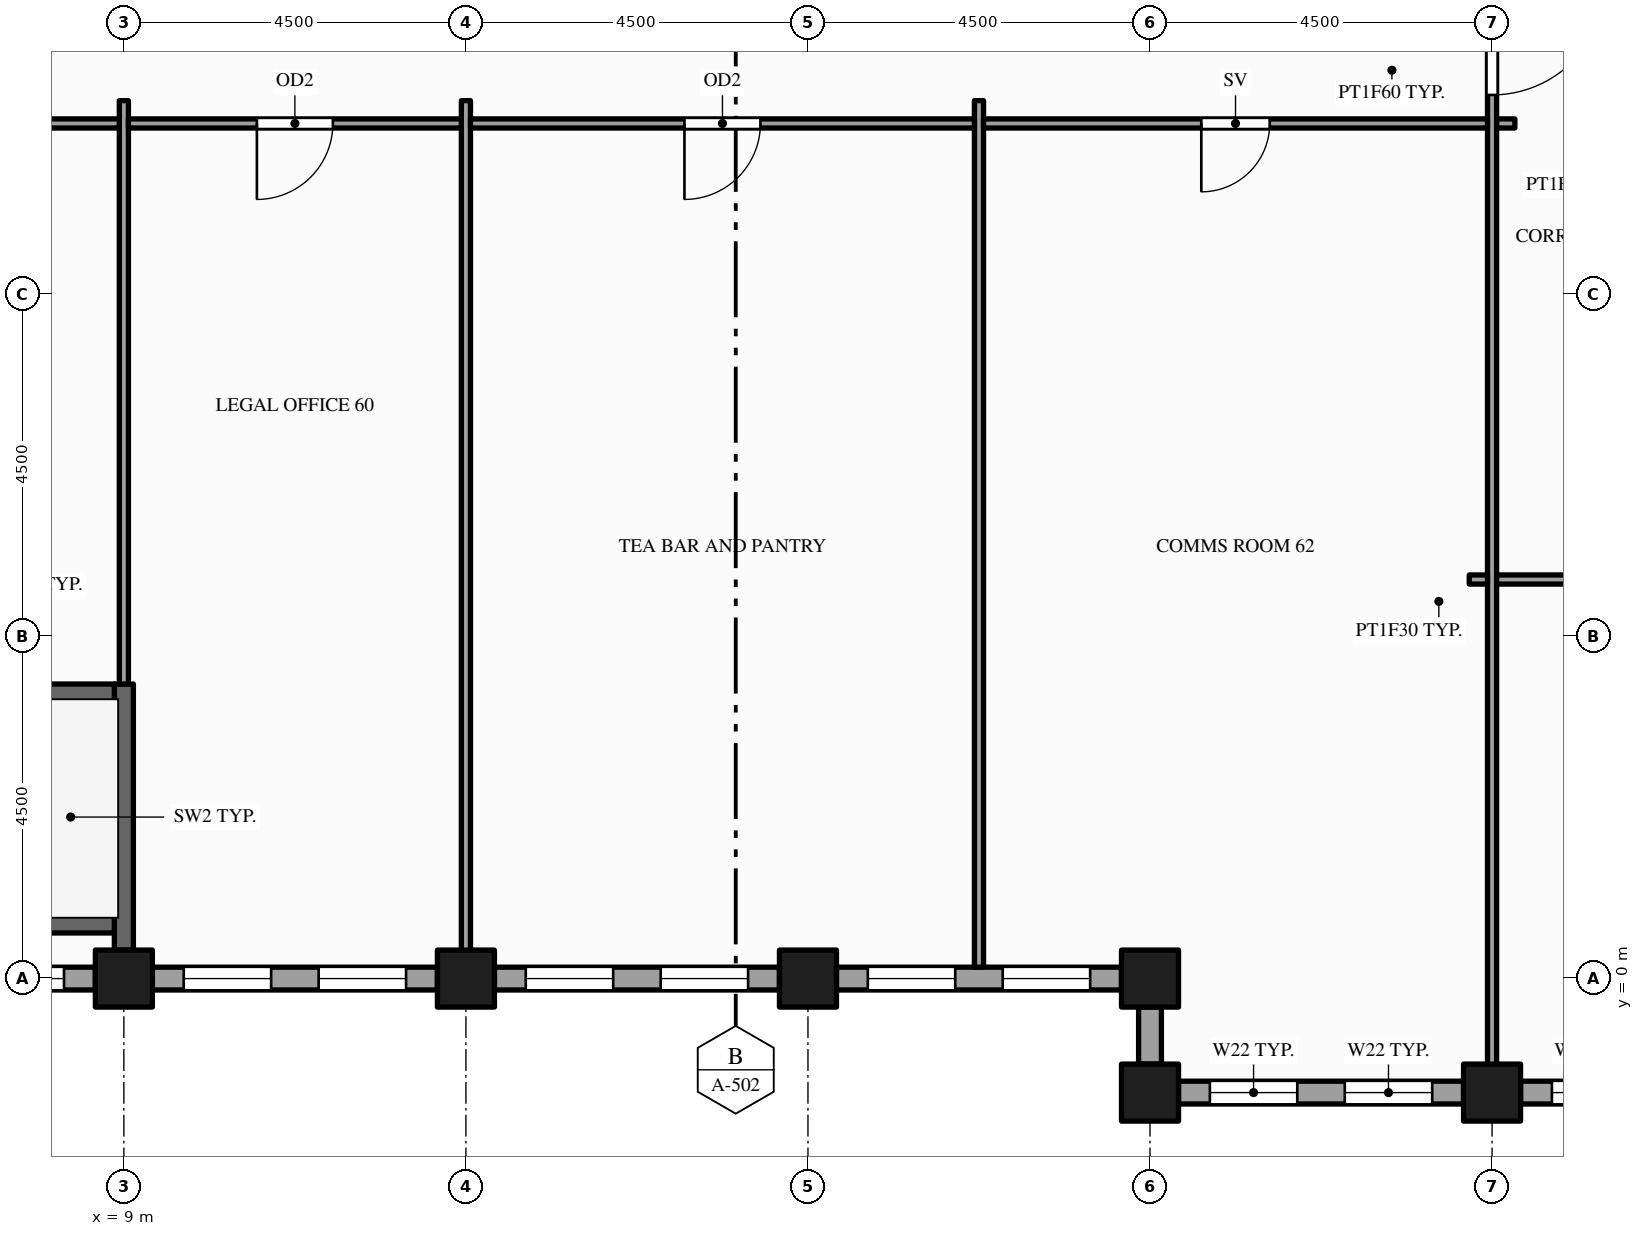
"""IFC4 building model, lengths in metres.
Left out: names, types, materials, properties, quantities, classifications, styles, units other than length and angle.
Written with IfcOpenShell. Run it as: python <this file> out.ifc"""

import sys

from ifc_helpers import new_model, si_unit, direction, frame, frame_2d, origin, origin_2d, place, context, subcontext, project, spatial, rectangle, hollow_rectangle, extrude, element, fill, save


model = new_model("IFC4")
c1 = context("Model", 3, precision=1e-05, world=origin(), true_north=direction((0.0, 1.0)))
c2 = subcontext(c1, "Body", "Model", "MODEL_VIEW")
j1 = project(units=[si_unit("LENGTHUNIT", "METRE"), si_unit("PLANEANGLEUNIT", "RADIAN")], contexts=[c1])
p1 = place(None, origin())
s1 = spatial("IfcSite", under=j1, at=p1, CompositionType="ELEMENT")
p2 = place(p1, origin())
s2 = spatial("IfcBuilding", under=s1, at=p2, CompositionType="ELEMENT")
p3 = place(p2, frame((0.0, 0.0, 211.0)))
s3 = spatial("IfcBuildingStorey", under=s2, at=p3, CompositionType="ELEMENT", Elevation=211.0)
for number, where, z_axis, x_axis in (
    (1, (9.0, 0.0, -0.15), (0.0, 0.0, 1.0), (1.0, 0.0, 0.0)),
    (2, (13.5, 0.0, -0.15), (0.0, 0.0, 1.0), (1.0, 0.0, 0.0)),
    (3, (18.0, 0.0, -0.15), (0.0, 0.0, 1.0), (1.0, 0.0, 0.0)),
    (4, (22.5, -1.5, -0.15), (0.0, 0.0, 1.0), (1.0, 0.0, 0.0)),
    (5, (22.5, 0.0, -0.15), (0.0, 0.0, 1.0), (1.0, 0.0, 0.0)),
    (6, (27.0, -1.5, -0.15), (0.0, 0.0, 1.0), (1.0, 0.0, 0.0)),
):
    element("IfcColumn", number, at=place(p3, frame(where, z_axis=z_axis, x_axis=x_axis)), inside=s3, PredefinedType="COLUMN", context=c2, shape_type="SweptSolid", body=[
        extrude(hollow_rectangle(XDim=0.75, YDim=0.75, WallThickness=0.036, at=origin_2d()), origin(), (0.0, 0.0, 1.0), 4.0),
    ])
p4 = place(p3, frame((22.875, -1.5, 0.0), z_axis=(0.0, 0.0, 1.0), x_axis=(1.0, 0.0, 0.0)))
e7 = element("IfcWall", 7, at=p4, inside=s3, PredefinedType="STANDARD", context=c2, shape_type="SweptSolid", body=[
    extrude(rectangle(XDim=3.75, YDim=0.3, at=frame_2d((1.875, 0.0))), origin(), (0.0, 0.0, 1.0), 2.76),
])
p5 = place(p4, frame((0.413, 0.0, 0.9)))
e8 = element("IfcOpeningElement", 8, at=p5, cuts=e7, PredefinedType="OPENING", context=c2, shape_type="SweptSolid", body=[
    extrude(rectangle(XDim=1.15, YDim=1.5, at=frame_2d((0.575, 0.75))), frame((0.0, 0.16, 0.0), z_axis=(0.0, -1.0, 0.0), x_axis=(1.0, 0.0, 0.0)), (0.0, 0.0, 1.0), 0.32),
])
p6 = place(p4, frame((2.188, 0.0, 0.9)))
e9 = element("IfcOpeningElement", 9, at=p6, cuts=e7, PredefinedType="OPENING", context=c2, shape_type="SweptSolid", body=[
    extrude(rectangle(XDim=1.15, YDim=1.5, at=frame_2d((0.575, 0.75))), frame((0.0, 0.16, 0.0), z_axis=(0.0, -1.0, 0.0), x_axis=(1.0, 0.0, 0.0)), (0.0, 0.0, 1.0), 0.32),
])
p7 = place(p3, frame((27.375, -1.5, 0.0), z_axis=(0.0, 0.0, 1.0), x_axis=(1.0, 0.0, 0.0)))
e10 = element("IfcWall", 10, at=p7, inside=s3, PredefinedType="STANDARD", context=c2, shape_type="SweptSolid", body=[
    extrude(rectangle(XDim=3.75, YDim=0.3, at=frame_2d((1.875, 0.0))), origin(), (0.0, 0.0, 1.0), 2.87),
])
p8 = place(p7, frame((0.413, 0.0, 0.9)))
e11 = element("IfcOpeningElement", 11, at=p8, cuts=e10, PredefinedType="OPENING", context=c2, shape_type="SweptSolid", body=[
    extrude(rectangle(XDim=1.15, YDim=1.75, at=frame_2d((0.575, 0.875))), frame((0.0, 0.16, 0.0), z_axis=(0.0, -1.0, 0.0), x_axis=(1.0, 0.0, 0.0)), (0.0, 0.0, 1.0), 0.32),
])
p9 = place(p7, frame((2.188, 0.0, 0.9)))
e12 = element("IfcOpeningElement", 12, at=p9, cuts=e10, PredefinedType="OPENING", context=c2, shape_type="SweptSolid", body=[
    extrude(rectangle(XDim=1.15, YDim=1.75, at=frame_2d((0.575, 0.875))), frame((0.0, 0.16, 0.0), z_axis=(0.0, -1.0, 0.0), x_axis=(1.0, 0.0, 0.0)), (0.0, 0.0, 1.0), 0.32),
])
p10 = place(p3, frame((4.875, 0.0, 0.0), z_axis=(0.0, 0.0, 1.0), x_axis=(1.0, 0.0, 0.0)))
e13 = element("IfcWall", 13, at=p10, inside=s3, PredefinedType="STANDARD", context=c2, shape_type="SweptSolid", body=[
    extrude(rectangle(XDim=3.75, YDim=0.3, at=frame_2d((1.875, 0.0))), origin(), (0.0, 0.0, 1.0), 3.157),
])
p11 = place(p10, frame((0.413, 0.0, 0.9)))
e14 = element("IfcOpeningElement", 14, at=p11, cuts=e13, PredefinedType="OPENING", context=c2, shape_type="SweptSolid", body=[
    extrude(rectangle(XDim=1.15, YDim=2.0, at=frame_2d((0.575, 1.0))), frame((0.0, 0.16, 0.0), z_axis=(0.0, -1.0, 0.0), x_axis=(1.0, 0.0, 0.0)), (0.0, 0.0, 1.0), 0.32),
])
p12 = place(p10, frame((2.188, 0.0, 0.9)))
e15 = element("IfcOpeningElement", 15, at=p12, cuts=e13, PredefinedType="OPENING", context=c2, shape_type="SweptSolid", body=[
    extrude(rectangle(XDim=1.15, YDim=2.0, at=frame_2d((0.575, 1.0))), frame((0.0, 0.16, 0.0), z_axis=(0.0, -1.0, 0.0), x_axis=(1.0, 0.0, 0.0)), (0.0, 0.0, 1.0), 0.32),
])
p13 = place(p3, frame((9.375, 0.0, 0.0), z_axis=(0.0, 0.0, 1.0), x_axis=(1.0, 0.0, 0.0)))
e16 = element("IfcWall", 16, at=p13, inside=s3, PredefinedType="STANDARD", context=c2, shape_type="SweptSolid", body=[
    extrude(rectangle(XDim=3.75, YDim=0.3, at=frame_2d((1.875, 0.0))), origin(), (0.0, 0.0, 1.0), 2.87),
])
p14 = place(p13, frame((0.413, 0.0, 0.9)))
e17 = element("IfcOpeningElement", 17, at=p14, cuts=e16, PredefinedType="OPENING", context=c2, shape_type="SweptSolid", body=[
    extrude(rectangle(XDim=1.15, YDim=1.75, at=frame_2d((0.575, 0.875))), frame((0.0, 0.16, 0.0), z_axis=(0.0, -1.0, 0.0), x_axis=(1.0, 0.0, 0.0)), (0.0, 0.0, 1.0), 0.32),
])
p15 = place(p13, frame((2.188, 0.0, 0.9)))
e18 = element("IfcOpeningElement", 18, at=p15, cuts=e16, PredefinedType="OPENING", context=c2, shape_type="SweptSolid", body=[
    extrude(rectangle(XDim=1.15, YDim=1.75, at=frame_2d((0.575, 0.875))), frame((0.0, 0.16, 0.0), z_axis=(0.0, -1.0, 0.0), x_axis=(1.0, 0.0, 0.0)), (0.0, 0.0, 1.0), 0.32),
])
p16 = place(p3, frame((13.875, 0.0, 0.0), z_axis=(0.0, 0.0, 1.0), x_axis=(1.0, 0.0, 0.0)))
e19 = element("IfcWall", 19, at=p16, inside=s3, PredefinedType="STANDARD", context=c2, shape_type="SweptSolid", body=[
    extrude(rectangle(XDim=3.75, YDim=0.3, at=frame_2d((1.875, 0.0))), origin(), (0.0, 0.0, 1.0), 2.87),
])
p17 = place(p16, frame((0.413, 0.0, 0.9)))
e20 = element("IfcOpeningElement", 20, at=p17, cuts=e19, PredefinedType="OPENING", context=c2, shape_type="SweptSolid", body=[
    extrude(rectangle(XDim=1.15, YDim=1.75, at=frame_2d((0.575, 0.875))), frame((0.0, 0.16, 0.0), z_axis=(0.0, -1.0, 0.0), x_axis=(1.0, 0.0, 0.0)), (0.0, 0.0, 1.0), 0.32),
])
p18 = place(p16, frame((2.188, 0.0, 0.9)))
e21 = element("IfcOpeningElement", 21, at=p18, cuts=e19, PredefinedType="OPENING", context=c2, shape_type="SweptSolid", body=[
    extrude(rectangle(XDim=1.15, YDim=1.75, at=frame_2d((0.575, 0.875))), frame((0.0, 0.16, 0.0), z_axis=(0.0, -1.0, 0.0), x_axis=(1.0, 0.0, 0.0)), (0.0, 0.0, 1.0), 0.32),
])
p19 = place(p3, frame((18.375, 0.0, 0.0), z_axis=(0.0, 0.0, 1.0), x_axis=(1.0, 0.0, 0.0)))
e22 = element("IfcWall", 22, at=p19, inside=s3, PredefinedType="STANDARD", context=c2, shape_type="SweptSolid", body=[
    extrude(rectangle(XDim=3.75, YDim=0.3, at=frame_2d((1.875, 0.0))), origin(), (0.0, 0.0, 1.0), 2.87),
])
p20 = place(p19, frame((0.413, 0.0, 0.9)))
e23 = element("IfcOpeningElement", 23, at=p20, cuts=e22, PredefinedType="OPENING", context=c2, shape_type="SweptSolid", body=[
    extrude(rectangle(XDim=1.15, YDim=1.75, at=frame_2d((0.575, 0.875))), frame((0.0, 0.16, 0.0), z_axis=(0.0, -1.0, 0.0), x_axis=(1.0, 0.0, 0.0)), (0.0, 0.0, 1.0), 0.32),
])
p21 = place(p19, frame((2.188, 0.0, 0.9)))
e24 = element("IfcOpeningElement", 24, at=p21, cuts=e22, PredefinedType="OPENING", context=c2, shape_type="SweptSolid", body=[
    extrude(rectangle(XDim=1.15, YDim=1.75, at=frame_2d((0.575, 0.875))), frame((0.0, 0.16, 0.0), z_axis=(0.0, -1.0, 0.0), x_axis=(1.0, 0.0, 0.0)), (0.0, 0.0, 1.0), 0.32),
])
p22 = place(p3, frame((22.5, -0.375, 0.0), z_axis=(0.0, 0.0, 1.0), x_axis=(0.0, -1.0, 0.0)))
e25 = element("IfcWall", 25, at=p22, inside=s3, PredefinedType="STANDARD", context=c2, shape_type="SweptSolid", body=[
    extrude(rectangle(XDim=0.75, YDim=0.3, at=frame_2d((0.375, 0.0))), origin(), (0.0, 0.0, 1.0), 3.157),
])
p23 = place(p3, frame((9.0, 0.375, 0.0), z_axis=(0.0, 0.0, 1.0), x_axis=(0.0, 1.0, 0.0)))
e26 = element("IfcWall", 26, at=p23, inside=s3, PredefinedType="SHEAR", context=c2, shape_type="SweptSolid", body=[
    extrude(rectangle(XDim=3.5, YDim=0.25, at=frame_2d((1.75, 0.0))), origin(), (0.0, 0.0, 1.0), 3.85),
])
p24 = place(p3, frame((9.0, 3.875, 0.0), z_axis=(0.0, 0.0, 1.0), x_axis=(0.0, 1.0, 0.0)))
e27 = element("IfcWall", 27, at=p24, inside=s3, PredefinedType="PARTITIONING", context=c2, shape_type="SweptSolid", body=[
    extrude(rectangle(XDim=7.675, YDim=0.12, at=frame_2d((3.837, 0.0))), origin(), (0.0, 0.0, 1.0), 2.87),
])
for number, where, z_axis, x_axis in (
    (28, (13.5, 0.15, 0.0), (0.0, 0.0, 1.0), (0.0, 1.0, 0.0)),
    (29, (20.25, 0.15, 0.0), (0.0, 0.0, 1.0), (0.0, 1.0, 0.0)),
):
    element("IfcWall", number, at=place(p3, frame(where, z_axis=z_axis, x_axis=x_axis)), inside=s3, PredefinedType="PARTITIONING", context=c2, shape_type="SweptSolid", body=[
        extrude(rectangle(XDim=11.4, YDim=0.12, at=frame_2d((5.7, 0.0))), origin(), (0.0, 0.0, 1.0), 2.87),
    ])
p25 = place(p3, frame((27.0, -1.35, 0.0), z_axis=(0.0, 0.0, 1.0), x_axis=(0.0, 1.0, 0.0)))
e30 = element("IfcWall", 30, at=p25, inside=s3, PredefinedType="PARTITIONING", context=c2, shape_type="SweptSolid", body=[
    extrude(rectangle(XDim=22.48, YDim=0.12, at=frame_2d((11.24, 0.0))), origin(), (0.0, 0.0, 1.0), 2.87),
])
p26 = place(p25, frame((12.975, 0.0, 0.0)))
e31 = element("IfcOpeningElement", 31, at=p26, cuts=e30, PredefinedType="OPENING", context=c2, shape_type="SweptSolid", body=[
    extrude(rectangle(XDim=1.5, YDim=2.1, at=frame_2d((0.75, 1.05))), frame((0.0, 0.07, 0.0), z_axis=(0.0, -1.0, 0.0), x_axis=(1.0, 0.0, 0.0)), (0.0, 0.0, 1.0), 0.14),
])
p27 = place(p3, frame((0.85, 0.725, 0.0), z_axis=(0.0, 0.0, 1.0), x_axis=(1.0, 0.0, 0.0)))
e32 = element("IfcWall", 32, at=p27, inside=s3, PredefinedType="SHEAR", context=c2, shape_type="SweptSolid", body=[
    extrude(rectangle(XDim=8.025, YDim=0.25, at=frame_2d((4.012, 0.0))), origin(), (0.0, 0.0, 1.0), 3.85),
])
p28 = place(p3, frame((0.85, 3.75, 0.0), z_axis=(0.0, 0.0, 1.0), x_axis=(1.0, 0.0, 0.0)))
e33 = element("IfcWall", 33, at=p28, inside=s3, PredefinedType="SHEAR", context=c2, shape_type="SweptSolid", body=[
    extrude(rectangle(XDim=8.025, YDim=0.25, at=frame_2d((4.012, 0.0))), origin(), (0.0, 0.0, 1.0), 3.85),
])
p29 = place(p28, frame((0.15, 0.0, 0.0)))
e34 = element("IfcOpeningElement", 34, at=p29, cuts=e33, PredefinedType="OPENING", context=c2, shape_type="SweptSolid", body=[
    extrude(rectangle(XDim=1.1, YDim=2.1, at=frame_2d((0.55, 1.05))), frame((0.0, 0.135, 0.0), z_axis=(0.0, -1.0, 0.0), x_axis=(1.0, 0.0, 0.0)), (0.0, 0.0, 1.0), 0.27),
])
p30 = place(p3, frame((26.7, 5.25, 0.0), z_axis=(0.0, 0.0, 1.0), x_axis=(1.0, 0.0, 0.0)))
e35 = element("IfcWall", 35, at=p30, inside=s3, PredefinedType="PARTITIONING", context=c2, shape_type="SweptSolid", body=[
    extrude(rectangle(XDim=0.24, YDim=0.12, at=frame_2d((0.12, 0.0))), origin(), (0.0, 0.0, 1.0), 2.87),
])
p31 = place(p3, frame((27.06, 5.25, 0.0), z_axis=(0.0, 0.0, 1.0), x_axis=(1.0, 0.0, 0.0)))
e36 = element("IfcWall", 36, at=p31, inside=s3, PredefinedType="PARTITIONING", context=c2, shape_type="SweptSolid", body=[
    extrude(rectangle(XDim=2.13, YDim=0.12, at=frame_2d((1.065, 0.0))), origin(), (0.0, 0.0, 1.0), 2.87),
])
p32 = place(p3, frame((0.15, 11.25, 0.0), z_axis=(0.0, 0.0, 1.0), x_axis=(1.0, 0.0, 0.0)))
e37 = element("IfcWall", 37, at=p32, inside=s3, PredefinedType="PARTITIONING", context=c2, shape_type="SweptSolid", body=[
    extrude(rectangle(XDim=8.79, YDim=0.12, at=frame_2d((4.395, 0.0))), origin(), (0.0, 0.0, 1.0), 2.87),
])
p33 = place(p32, frame((3.805, 0.0, 0.0)))
e38 = element("IfcOpeningElement", 38, at=p33, cuts=e37, PredefinedType="OPENING", context=c2, shape_type="SweptSolid", body=[
    extrude(rectangle(XDim=1.2, YDim=2.1, at=frame_2d((0.6, 1.05))), frame((0.0, 0.07, 0.0), z_axis=(0.0, -1.0, 0.0), x_axis=(1.0, 0.0, 0.0)), (0.0, 0.0, 1.0), 0.14),
])
p34 = place(p3, frame((9.06, 11.25, 0.0), z_axis=(0.0, 0.0, 1.0), x_axis=(1.0, 0.0, 0.0)))
e39 = element("IfcWall", 39, at=p34, inside=s3, PredefinedType="PARTITIONING", context=c2, shape_type="SweptSolid", body=[
    extrude(rectangle(XDim=4.38, YDim=0.12, at=frame_2d((2.19, 0.0))), origin(), (0.0, 0.0, 1.0), 2.87),
])
p35 = place(p34, frame((1.69, 0.0, 0.0)))
e40 = element("IfcOpeningElement", 40, at=p35, cuts=e39, PredefinedType="OPENING", context=c2, shape_type="SweptSolid", body=[
    extrude(rectangle(XDim=1.0, YDim=2.1, at=frame_2d((0.5, 1.05))), frame((0.0, 0.07, 0.0), z_axis=(0.0, -1.0, 0.0), x_axis=(1.0, 0.0, 0.0)), (0.0, 0.0, 1.0), 0.14),
])
p36 = place(p3, frame((13.56, 11.25, 0.0), z_axis=(0.0, 0.0, 1.0), x_axis=(1.0, 0.0, 0.0)))
e41 = element("IfcWall", 41, at=p36, inside=s3, PredefinedType="PARTITIONING", context=c2, shape_type="SweptSolid", body=[
    extrude(rectangle(XDim=6.63, YDim=0.12, at=frame_2d((3.315, 0.0))), origin(), (0.0, 0.0, 1.0), 2.87),
])
p37 = place(p36, frame((2.815, 0.0, 0.0)))
e42 = element("IfcOpeningElement", 42, at=p37, cuts=e41, PredefinedType="OPENING", context=c2, shape_type="SweptSolid", body=[
    extrude(rectangle(XDim=1.0, YDim=2.1, at=frame_2d((0.5, 1.05))), frame((0.0, 0.07, 0.0), z_axis=(0.0, -1.0, 0.0), x_axis=(1.0, 0.0, 0.0)), (0.0, 0.0, 1.0), 0.14),
])
p38 = place(p3, frame((20.31, 11.25, 0.0), z_axis=(0.0, 0.0, 1.0), x_axis=(1.0, 0.0, 0.0)))
e43 = element("IfcWall", 43, at=p38, inside=s3, PredefinedType="PARTITIONING", context=c2, shape_type="SweptSolid", body=[
    extrude(rectangle(XDim=6.63, YDim=0.12, at=frame_2d((3.315, 0.0))), origin(), (0.0, 0.0, 1.0), 2.76),
])
p39 = place(p38, frame((2.865, 0.0, 0.0)))
e44 = element("IfcOpeningElement", 44, at=p39, cuts=e43, PredefinedType="OPENING", context=c2, shape_type="SweptSolid", body=[
    extrude(rectangle(XDim=0.9, YDim=2.1, at=frame_2d((0.45, 1.05))), frame((0.0, 0.07, 0.0), z_axis=(0.0, -1.0, 0.0), x_axis=(1.0, 0.0, 0.0)), (0.0, 0.0, 1.0), 0.14),
])
p40 = place(p3, frame((27.06, 11.25, 0.0), z_axis=(0.0, 0.0, 1.0), x_axis=(1.0, 0.0, 0.0)))
e45 = element("IfcWall", 45, at=p40, inside=s3, PredefinedType="PARTITIONING", context=c2, shape_type="SweptSolid", body=[
    extrude(rectangle(XDim=0.24, YDim=0.12, at=frame_2d((0.12, 0.0))), origin(), (0.0, 0.0, 1.0), 2.87),
])
p41 = place(p5, origin())
e46 = element("IfcWindow", 46, at=p41, inside=s3, PartitioningType="SINGLE_PANEL", PredefinedType="WINDOW", context=c2, shape_type="SweptSolid", body=[
    extrude(rectangle(XDim=1.15, YDim=1.5, at=frame_2d((0.575, 0.75))), frame((0.0, 0.03, 0.0), z_axis=(0.0, -1.0, 0.0), x_axis=(1.0, 0.0, 0.0)), (0.0, 0.0, 1.0), 0.06),
])
fill(e8, e46)
p42 = place(p6, origin())
e47 = element("IfcWindow", 47, at=p42, inside=s3, PartitioningType="SINGLE_PANEL", PredefinedType="WINDOW", context=c2, shape_type="SweptSolid", body=[
    extrude(rectangle(XDim=1.15, YDim=1.5, at=frame_2d((0.575, 0.75))), frame((0.0, 0.03, 0.0), z_axis=(0.0, -1.0, 0.0), x_axis=(1.0, 0.0, 0.0)), (0.0, 0.0, 1.0), 0.06),
])
fill(e9, e47)
p43 = place(p8, origin())
e48 = element("IfcWindow", 48, at=p43, inside=s3, PartitioningType="SINGLE_PANEL", PredefinedType="WINDOW", context=c2, shape_type="SweptSolid", body=[
    extrude(rectangle(XDim=1.15, YDim=1.75, at=frame_2d((0.575, 0.875))), frame((0.0, 0.03, 0.0), z_axis=(0.0, -1.0, 0.0), x_axis=(1.0, 0.0, 0.0)), (0.0, 0.0, 1.0), 0.06),
])
fill(e11, e48)
p44 = place(p12, origin())
e49 = element("IfcWindow", 49, at=p44, inside=s3, PartitioningType="SINGLE_PANEL", PredefinedType="WINDOW", context=c2, shape_type="SweptSolid", body=[
    extrude(rectangle(XDim=1.15, YDim=2.0, at=frame_2d((0.575, 1.0))), frame((0.0, 0.03, 0.0), z_axis=(0.0, -1.0, 0.0), x_axis=(1.0, 0.0, 0.0)), (0.0, 0.0, 1.0), 0.06),
])
fill(e15, e49)
p45 = place(p14, origin())
e50 = element("IfcWindow", 50, at=p45, inside=s3, PartitioningType="SINGLE_PANEL", PredefinedType="WINDOW", context=c2, shape_type="SweptSolid", body=[
    extrude(rectangle(XDim=1.15, YDim=1.75, at=frame_2d((0.575, 0.875))), frame((0.0, 0.03, 0.0), z_axis=(0.0, -1.0, 0.0), x_axis=(1.0, 0.0, 0.0)), (0.0, 0.0, 1.0), 0.06),
])
fill(e17, e50)
p46 = place(p15, origin())
e51 = element("IfcWindow", 51, at=p46, inside=s3, PartitioningType="SINGLE_PANEL", PredefinedType="WINDOW", context=c2, shape_type="SweptSolid", body=[
    extrude(rectangle(XDim=1.15, YDim=1.75, at=frame_2d((0.575, 0.875))), frame((0.0, 0.03, 0.0), z_axis=(0.0, -1.0, 0.0), x_axis=(1.0, 0.0, 0.0)), (0.0, 0.0, 1.0), 0.06),
])
fill(e18, e51)
p47 = place(p17, origin())
e52 = element("IfcWindow", 52, at=p47, inside=s3, PartitioningType="SINGLE_PANEL", PredefinedType="WINDOW", context=c2, shape_type="SweptSolid", body=[
    extrude(rectangle(XDim=1.15, YDim=1.75, at=frame_2d((0.575, 0.875))), frame((0.0, 0.03, 0.0), z_axis=(0.0, -1.0, 0.0), x_axis=(1.0, 0.0, 0.0)), (0.0, 0.0, 1.0), 0.06),
])
fill(e20, e52)
p48 = place(p18, origin())
e53 = element("IfcWindow", 53, at=p48, inside=s3, PartitioningType="SINGLE_PANEL", PredefinedType="WINDOW", context=c2, shape_type="SweptSolid", body=[
    extrude(rectangle(XDim=1.15, YDim=1.75, at=frame_2d((0.575, 0.875))), frame((0.0, 0.03, 0.0), z_axis=(0.0, -1.0, 0.0), x_axis=(1.0, 0.0, 0.0)), (0.0, 0.0, 1.0), 0.06),
])
fill(e21, e53)
p49 = place(p20, origin())
e54 = element("IfcWindow", 54, at=p49, inside=s3, PartitioningType="SINGLE_PANEL", PredefinedType="WINDOW", context=c2, shape_type="SweptSolid", body=[
    extrude(rectangle(XDim=1.15, YDim=1.75, at=frame_2d((0.575, 0.875))), frame((0.0, 0.03, 0.0), z_axis=(0.0, -1.0, 0.0), x_axis=(1.0, 0.0, 0.0)), (0.0, 0.0, 1.0), 0.06),
])
fill(e23, e54)
p50 = place(p21, origin())
e55 = element("IfcWindow", 55, at=p50, inside=s3, PartitioningType="SINGLE_PANEL", PredefinedType="WINDOW", context=c2, shape_type="SweptSolid", body=[
    extrude(rectangle(XDim=1.15, YDim=1.75, at=frame_2d((0.575, 0.875))), frame((0.0, 0.03, 0.0), z_axis=(0.0, -1.0, 0.0), x_axis=(1.0, 0.0, 0.0)), (0.0, 0.0, 1.0), 0.06),
])
fill(e24, e55)
p51 = place(p26, origin())
e56 = element("IfcDoor", 56, at=p51, inside=s3, OperationType="SINGLE_SWING_RIGHT", PredefinedType="DOOR", context=c2, shape_type="SweptSolid", body=[
    extrude(rectangle(XDim=1.5, YDim=2.1, at=frame_2d((0.75, 1.05))), frame((0.0, 0.025, 0.0), z_axis=(0.0, -1.0, 0.0), x_axis=(1.0, 0.0, 0.0)), (0.0, 0.0, 1.0), 0.05),
])
fill(e31, e56)
p52 = place(p35, origin())
e57 = element("IfcDoor", 57, at=p52, inside=s3, OperationType="SINGLE_SWING_LEFT", PredefinedType="DOOR", context=c2, shape_type="SweptSolid", body=[
    extrude(rectangle(XDim=1.0, YDim=2.1, at=frame_2d((0.5, 1.05))), frame((0.0, 0.025, 0.0), z_axis=(0.0, -1.0, 0.0), x_axis=(1.0, 0.0, 0.0)), (0.0, 0.0, 1.0), 0.05),
])
fill(e40, e57)
p53 = place(p37, origin())
e58 = element("IfcDoor", 58, at=p53, inside=s3, OperationType="SINGLE_SWING_LEFT", PredefinedType="DOOR", context=c2, shape_type="SweptSolid", body=[
    extrude(rectangle(XDim=1.0, YDim=2.1, at=frame_2d((0.5, 1.05))), frame((0.0, 0.025, 0.0), z_axis=(0.0, -1.0, 0.0), x_axis=(1.0, 0.0, 0.0)), (0.0, 0.0, 1.0), 0.05),
])
fill(e42, e58)
p54 = place(p39, origin())
e59 = element("IfcDoor", 59, at=p54, inside=s3, OperationType="SINGLE_SWING_LEFT", PredefinedType="DOOR", context=c2, shape_type="SweptSolid", body=[
    extrude(rectangle(XDim=0.9, YDim=2.1, at=frame_2d((0.45, 1.05))), frame((0.0, 0.025, 0.0), z_axis=(0.0, -1.0, 0.0), x_axis=(1.0, 0.0, 0.0)), (0.0, 0.0, 1.0), 0.05),
])
fill(e44, e59)
save(model, sys.argv[1])
